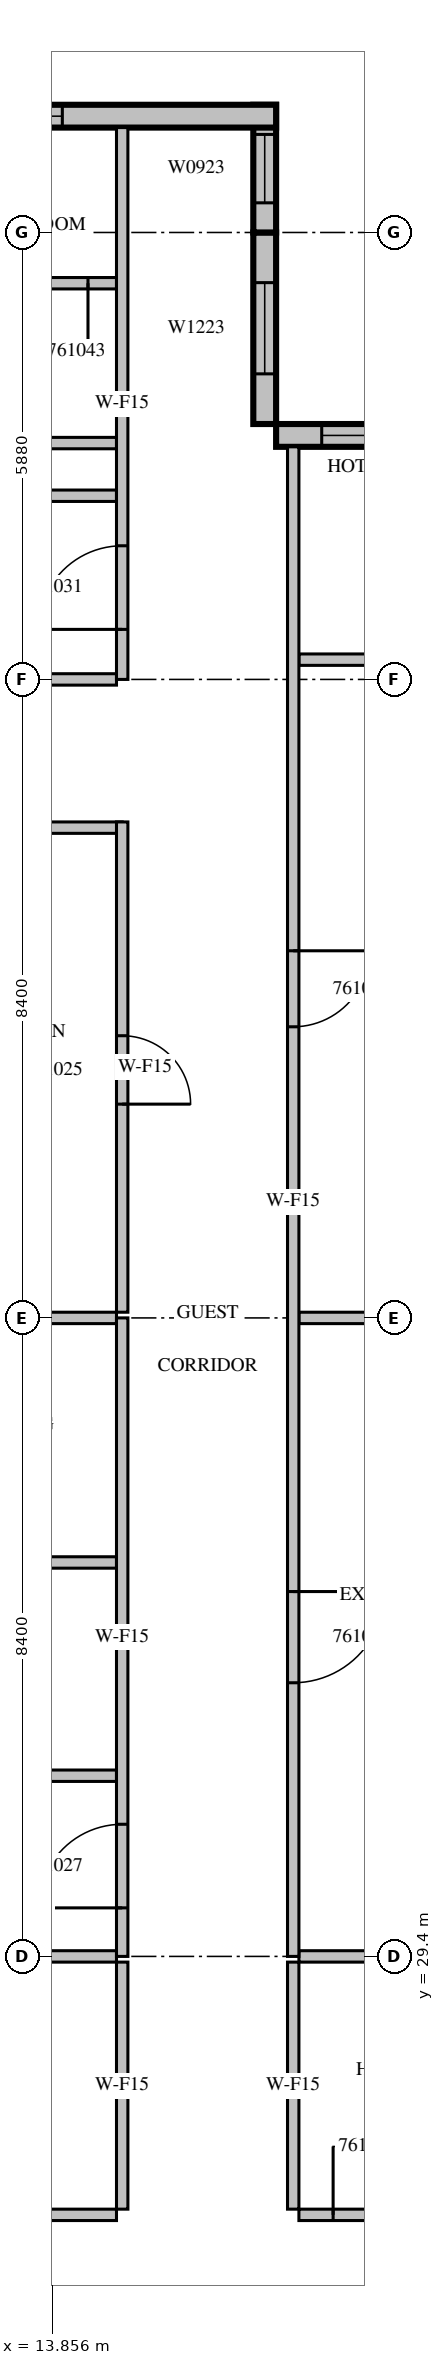
"""IFC4 building model, lengths in metres.
Left out: names, types, materials, properties, quantities, classifications, styles, units other than length and angle.
Written with IfcOpenShell. Run it as: python <this file> out.ifc"""

import sys

from ifc_helpers import new_model, si_unit, direction, frame, frame_2d, origin, place, context, subcontext, project, spatial, rectangle, extrude, source, transform, mapped, element, fill, save


model = new_model("IFC4")
c1 = context("Model", 3, precision=1e-05, world=origin(), true_north=direction((0.0, 1.0)))
c2 = subcontext(c1, "Body", "Model", "MODEL_VIEW")
j1 = project(units=[si_unit("LENGTHUNIT", "METRE"), si_unit("PLANEANGLEUNIT", "RADIAN")], contexts=[c1])
p1 = place(None, origin())
s1 = spatial("IfcSite", under=j1, at=p1, CompositionType="ELEMENT")
p2 = place(p1, origin())
s2 = spatial("IfcBuilding", under=s1, at=p2, CompositionType="ELEMENT")
p3 = place(p2, frame((0.0, 0.0, 265.2)))
s3 = spatial("IfcBuildingStorey", under=s2, at=p3, CompositionType="ELEMENT", Elevation=265.2)
m1 = source(origin(), c2, "Body", "SweptSolid", [
    extrude(rectangle(XDim=4.2, YDim=0.3, at=frame_2d((2.1, 0.0))), origin(), (0.0, 0.0, 1.0), 3.4),
])
p4 = place(p3, frame((21.0, 49.41, 0.0), z_axis=(0.0, 0.0, 1.0), x_axis=(-1.0, 0.0, 0.0)))
e1 = element("IfcWall", 1, at=p4, inside=s3, PredefinedType="STANDARD", context=c2, shape_type="MappedRepresentation", body=[
    mapped(m1, transform((0.0, 0.0, 0.0), scale=1.0)),
])
m2 = source(origin(), c2, "Body", "SweptSolid", [
    extrude(rectangle(XDim=3.0, YDim=2.3, at=frame_2d((1.5, 1.15))), frame((0.0, 0.16, 0.0), z_axis=(0.0, -1.0, 0.0), x_axis=(1.0, 0.0, 0.0)), (0.0, 0.0, 1.0), 0.32),
])
p5 = place(p4, frame((0.6, 0.0, 0.6)))
e2 = element("IfcOpeningElement", 2, at=p5, cuts=e1, PredefinedType="OPENING", context=c2, shape_type="MappedRepresentation", body=[
    mapped(m2, transform((0.0, 0.0, 0.0), scale=1.0)),
])
m3 = source(origin(), c2, "Body", "SweptSolid", [
    extrude(rectangle(XDim=2.52, YDim=0.3, at=frame_2d((1.26, 0.0))), origin(), (0.0, 0.0, 1.0), 3.4),
])
p6 = place(p3, frame((16.65, 49.56, 0.0), z_axis=(0.0, 0.0, 1.0), x_axis=(0.0, 1.0, 0.0)))
e3 = element("IfcWall", 3, at=p6, inside=s3, PredefinedType="STANDARD", context=c2, shape_type="MappedRepresentation", body=[
    mapped(m3, transform((0.0, 0.0, 0.0), scale=1.0)),
])
m4 = source(origin(), c2, "Body", "SweptSolid", [
    extrude(rectangle(XDim=1.2, YDim=2.3, at=frame_2d((0.6, 1.15))), frame((0.0, 0.16, 0.0), z_axis=(0.0, -1.0, 0.0), x_axis=(1.0, 0.0, 0.0)), (0.0, 0.0, 1.0), 0.32),
])
p7 = place(p6, frame((0.66, 0.0, 0.6)))
e4 = element("IfcOpeningElement", 4, at=p7, cuts=e3, PredefinedType="OPENING", context=c2, shape_type="MappedRepresentation", body=[
    mapped(m4, transform((0.0, 0.0, 0.0), scale=1.0)),
])
m5 = source(origin(), c2, "Body", "SweptSolid", [
    extrude(rectangle(XDim=1.68, YDim=0.3, at=frame_2d((0.84, 0.0))), origin(), (0.0, 0.0, 1.0), 3.4),
])
p8 = place(p3, frame((16.65, 52.08, 0.0), z_axis=(0.0, 0.0, 1.0), x_axis=(0.0, 1.0, 0.0)))
e5 = element("IfcWall", 5, at=p8, inside=s3, PredefinedType="STANDARD", context=c2, shape_type="MappedRepresentation", body=[
    mapped(m5, transform((0.0, 0.0, 0.0), scale=1.0)),
])
m6 = source(origin(), c2, "Body", "SweptSolid", [
    extrude(rectangle(XDim=0.9, YDim=2.3, at=frame_2d((0.45, 1.15))), frame((0.0, 0.16, 0.0), z_axis=(0.0, -1.0, 0.0), x_axis=(1.0, 0.0, 0.0)), (0.0, 0.0, 1.0), 0.32),
])
p9 = place(p8, frame((0.39, 0.0, 0.6)))
e6 = element("IfcOpeningElement", 6, at=p9, cuts=e5, PredefinedType="OPENING", context=c2, shape_type="MappedRepresentation", body=[
    mapped(m6, transform((0.0, 0.0, 0.0), scale=1.0)),
])
m7 = source(origin(), c2, "Body", "SweptSolid", [
    extrude(rectangle(XDim=10.5, YDim=0.3, at=frame_2d((5.25, 0.0))), origin(), (0.0, 0.0, 1.0), 3.4),
])
p10 = place(p3, frame((16.8, 53.61, 0.0), z_axis=(0.0, 0.0, 1.0), x_axis=(-1.0, 0.0, 0.0)))
e7 = element("IfcWall", 7, at=p10, inside=s3, PredefinedType="STANDARD", context=c2, shape_type="MappedRepresentation", body=[
    mapped(m7, transform((0.0, 0.0, 0.0), scale=1.0)),
])
m8 = source(origin(), c2, "Body", "SweptSolid", [
    extrude(rectangle(XDim=1.8, YDim=2.3, at=frame_2d((0.9, 1.15))), frame((0.0, 0.16, 0.0), z_axis=(0.0, -1.0, 0.0), x_axis=(1.0, 0.0, 0.0)), (0.0, 0.0, 1.0), 0.32),
])
p11 = place(p10, frame((8.025, 0.0, 0.6)))
e8 = element("IfcOpeningElement", 8, at=p11, cuts=e7, PredefinedType="OPENING", context=c2, shape_type="MappedRepresentation", body=[
    mapped(m8, transform((0.0, 0.0, 0.0), scale=1.0)),
])
m9 = source(origin(), c2, "Body", "SweptSolid", [
    extrude(rectangle(XDim=2.4, YDim=2.3, at=frame_2d((1.2, 1.15))), frame((0.0, 0.16, 0.0), z_axis=(0.0, -1.0, 0.0), x_axis=(1.0, 0.0, 0.0)), (0.0, 0.0, 1.0), 0.32),
])
p12 = place(p10, frame((2.812, 0.0, 0.6)))
e9 = element("IfcOpeningElement", 9, at=p12, cuts=e7, PredefinedType="OPENING", context=c2, shape_type="MappedRepresentation", body=[
    mapped(m9, transform((0.0, 0.0, 0.0), scale=1.0)),
])
m10 = source(origin(), c2, "Body", "SweptSolid", [
    extrude(rectangle(XDim=8.195, YDim=0.15, at=frame_2d((4.098, 0.0))), origin(), (0.0, 0.0, 1.0), 3.4),
])
p13 = place(p3, frame((6.505, 26.0, 0.0), z_axis=(0.0, 0.0, 1.0), x_axis=(1.0, 0.0, 0.0)))
e10 = element("IfcWall", 10, at=p13, inside=s3, PredefinedType="PARTITIONING", context=c2, shape_type="MappedRepresentation", body=[
    mapped(m10, transform((0.0, 0.0, 0.0), scale=1.0)),
])
m11 = source(origin(), c2, "Body", "SweptSolid", [
    extrude(rectangle(XDim=0.9, YDim=2.1, at=frame_2d((0.45, 1.05))), frame((0.0, 0.085, 0.0), z_axis=(0.0, -1.0, 0.0), x_axis=(1.0, 0.0, 0.0)), (0.0, 0.0, 1.0), 0.17),
])
p14 = place(p13, frame((0.695, 0.0, 0.0)))
e11 = element("IfcOpeningElement", 11, at=p14, cuts=e10, PredefinedType="OPENING", context=c2, shape_type="MappedRepresentation", body=[
    mapped(m11, transform((0.0, 0.0, 0.0), scale=1.0)),
])
p15 = place(p13, frame((5.62, 0.0, 0.0)))
e12 = element("IfcOpeningElement", 12, at=p15, cuts=e10, PredefinedType="OPENING", context=c2, shape_type="MappedRepresentation", body=[
    mapped(m11, transform((0.0, 0.0, 0.0), scale=1.0)),
])
m12 = source(origin(), c2, "Body", "SweptSolid", [
    extrude(rectangle(XDim=3.6, YDim=0.15, at=frame_2d((1.8, 0.0))), origin(), (0.0, 0.0, 1.0), 3.4),
])
p16 = place(p3, frame((17.1, 26.0, 0.0), z_axis=(0.0, 0.0, 1.0), x_axis=(1.0, 0.0, 0.0)))
e13 = element("IfcWall", 13, at=p16, inside=s3, PredefinedType="PARTITIONING", context=c2, shape_type="MappedRepresentation", body=[
    mapped(m12, transform((0.0, 0.0, 0.0), scale=1.0)),
])
p17 = place(p16, frame((0.45, 0.0, 0.0)))
e14 = element("IfcOpeningElement", 14, at=p17, cuts=e13, PredefinedType="OPENING", context=c2, shape_type="MappedRepresentation", body=[
    mapped(m11, transform((0.0, 0.0, 0.0), scale=1.0)),
])
m13 = source(origin(), c2, "Body", "SweptSolid", [
    extrude(rectangle(XDim=3.25, YDim=0.15, at=frame_2d((1.625, 0.0))), origin(), (0.0, 0.0, 1.0), 3.4),
])
for number, where, z_axis, x_axis in (
    (15, (14.775, 26.075, 0.0), (0.0, 0.0, 1.0), (0.0, 1.0, 0.0)),
    (16, (17.025, 29.325, 0.0), (0.0, 0.0, 1.0), (0.0, -1.0, 0.0)),
):
    element("IfcWall", number, at=place(p3, frame(where, z_axis=z_axis, x_axis=x_axis)), inside=s3, PredefinedType="PARTITIONING", context=c2, shape_type="MappedRepresentation", body=[
        mapped(m13, transform((0.0, 0.0, 0.0), scale=1.0)),
    ])
m14 = source(origin(), c2, "Body", "SweptSolid", [
    extrude(rectangle(XDim=3.801, YDim=0.15, at=frame_2d((1.901, 0.0))), origin(), (0.0, 0.0, 1.0), 3.4),
])
p18 = place(p3, frame((14.7, 29.4, 0.0), z_axis=(0.0, 0.0, 1.0), x_axis=(-1.0, 0.0, 0.0)))
e17 = element("IfcWall", 17, at=p18, inside=s3, PredefinedType="PARTITIONING", context=c2, shape_type="MappedRepresentation", body=[
    mapped(m14, transform((0.0, 0.0, 0.0), scale=1.0)),
])
m15 = source(origin(), c2, "Body", "SweptSolid", [
    extrude(rectangle(XDim=3.101, YDim=0.15, at=frame_2d((1.55, 0.0))), origin(), (0.0, 0.0, 1.0), 3.4),
])
p19 = place(p3, frame((20.201, 29.4, 0.0), z_axis=(0.0, 0.0, 1.0), x_axis=(-1.0, 0.0, 0.0)))
e18 = element("IfcWall", 18, at=p19, inside=s3, PredefinedType="PARTITIONING", context=c2, shape_type="MappedRepresentation", body=[
    mapped(m15, transform((0.0, 0.0, 0.0), scale=1.0)),
])
m16 = source(origin(), c2, "Body", "SweptSolid", [
    extrude(rectangle(XDim=3.675, YDim=0.15, at=frame_2d((1.837, 0.0))), origin(), (0.0, 0.0, 1.0), 3.4),
])
p20 = place(p3, frame((14.775, 44.25, 0.0), z_axis=(0.0, 0.0, 1.0), x_axis=(-1.0, 0.0, 0.0)))
e19 = element("IfcWall", 19, at=p20, inside=s3, PredefinedType="PARTITIONING", context=c2, shape_type="MappedRepresentation", body=[
    mapped(m16, transform((0.0, 0.0, 0.0), scale=1.0)),
])
m17 = source(origin(), c2, "Body", "SweptSolid", [
    extrude(rectangle(XDim=6.45, YDim=0.15, at=frame_2d((3.225, 0.0))), origin(), (0.0, 0.0, 1.0), 3.4),
])
p21 = place(p3, frame((14.775, 37.875, 0.0), z_axis=(0.0, 0.0, 1.0), x_axis=(0.0, 1.0, 0.0)))
e20 = element("IfcWall", 20, at=p21, inside=s3, PredefinedType="PARTITIONING", context=c2, shape_type="MappedRepresentation", body=[
    mapped(m17, transform((0.0, 0.0, 0.0), scale=1.0)),
])
p22 = place(p21, frame((2.737, 0.0, 0.0)))
e21 = element("IfcOpeningElement", 21, at=p22, cuts=e20, PredefinedType="OPENING", context=c2, shape_type="MappedRepresentation", body=[
    mapped(m11, transform((0.0, 0.0, 0.0), scale=1.0)),
])
m18 = source(origin(), c2, "Body", "SweptSolid", [
    extrude(rectangle(XDim=3.65, YDim=0.15, at=frame_2d((1.825, 0.0))), origin(), (0.0, 0.0, 1.0), 3.4),
])
for number, where, z_axis, x_axis in (
    (22, (14.7, 31.777, 0.0), (0.0, 0.0, 1.0), (-1.0, 0.0, 0.0)),
    (23, (14.7, 34.583, 0.0), (0.0, 0.0, 1.0), (-1.0, 0.0, 0.0)),
    (24, (14.7, 37.8, 0.0), (0.0, 0.0, 1.0), (-1.0, 0.0, 0.0)),
    (25, (14.7, 48.617, 0.0), (0.0, 0.0, 1.0), (-1.0, 0.0, 0.0)),
    (26, (14.7, 49.309, 0.0), (0.0, 0.0, 1.0), (-1.0, 0.0, 0.0)),
):
    element("IfcWall", number, at=place(p3, frame(where, z_axis=z_axis, x_axis=x_axis)), inside=s3, PredefinedType="PARTITIONING", context=c2, shape_type="MappedRepresentation", body=[
        mapped(m18, transform((0.0, 0.0, 0.0), scale=1.0)),
    ])
p23 = place(p3, frame((14.7, 51.412, 0.0), z_axis=(0.0, 0.0, 1.0), x_axis=(-1.0, 0.0, 0.0)))
e27 = element("IfcWall", 27, at=p23, inside=s3, PredefinedType="PARTITIONING", context=c2, shape_type="MappedRepresentation", body=[
    mapped(m18, transform((0.0, 0.0, 0.0), scale=1.0)),
])
p24 = place(p23, frame((1.375, 0.0, 0.0)))
e28 = element("IfcOpeningElement", 28, at=p24, cuts=e27, PredefinedType="OPENING", context=c2, shape_type="MappedRepresentation", body=[
    mapped(m11, transform((0.0, 0.0, 0.0), scale=1.0)),
])
p25 = place(p23, frame((0.375, 0.0, 0.0)))
e29 = element("IfcOpeningElement", 29, at=p25, cuts=e27, PredefinedType="OPENING", context=c2, shape_type="MappedRepresentation", body=[
    mapped(m11, transform((0.0, 0.0, 0.0), scale=1.0)),
])
p26 = place(p23, frame((2.375, 0.0, 0.0)))
e30 = element("IfcOpeningElement", 30, at=p26, cuts=e27, PredefinedType="OPENING", context=c2, shape_type="MappedRepresentation", body=[
    mapped(m11, transform((0.0, 0.0, 0.0), scale=1.0)),
])
p27 = place(p3, frame((14.7, 46.2, 0.0), z_axis=(0.0, 0.0, 1.0), x_axis=(-1.0, 0.0, 0.0)))
e31 = element("IfcWall", 31, at=p27, inside=s3, PredefinedType="PARTITIONING", context=c2, shape_type="MappedRepresentation", body=[
    mapped(m18, transform((0.0, 0.0, 0.0), scale=1.0)),
])
p28 = place(p3, frame((17.1, 46.46, 0.0), z_axis=(0.0, 0.0, 1.0), x_axis=(1.0, 0.0, 0.0)))
e32 = element("IfcWall", 32, at=p28, inside=s3, PredefinedType="PARTITIONING", context=c2, shape_type="MappedRepresentation", body=[
    mapped(m15, transform((0.0, 0.0, 0.0), scale=1.0)),
])
p29 = place(p28, frame((1.35, 0.0, 0.0)))
e33 = element("IfcOpeningElement", 33, at=p29, cuts=e32, PredefinedType="OPENING", context=c2, shape_type="MappedRepresentation", body=[
    mapped(m11, transform((0.0, 0.0, 0.0), scale=1.0)),
])
p30 = place(p3, frame((20.201, 37.8, 0.0), z_axis=(0.0, 0.0, 1.0), x_axis=(-1.0, 0.0, 0.0)))
e34 = element("IfcWall", 34, at=p30, inside=s3, PredefinedType="PARTITIONING", context=c2, shape_type="MappedRepresentation", body=[
    mapped(m15, transform((0.0, 0.0, 0.0), scale=1.0)),
])
m19 = source(origin(), c2, "Body", "SweptSolid", [
    extrude(rectangle(XDim=8.4, YDim=0.15, at=frame_2d((4.2, 0.0))), origin(), (0.0, 0.0, 1.0), 3.4),
])
p31 = place(p3, frame((14.775, 29.4, 0.0), z_axis=(0.0, 0.0, 1.0), x_axis=(0.0, 1.0, 0.0)))
e35 = element("IfcWall", 35, at=p31, inside=s3, PredefinedType="PARTITIONING", context=c2, shape_type="MappedRepresentation", body=[
    mapped(m19, transform((0.0, 0.0, 0.0), scale=1.0)),
])
m20 = source(origin(), c2, "Body", "SweptSolid", [
    extrude(rectangle(XDim=1.1, YDim=2.1, at=frame_2d((0.55, 1.05))), frame((0.0, 0.085, 0.0), z_axis=(0.0, -1.0, 0.0), x_axis=(1.0, 0.0, 0.0)), (0.0, 0.0, 1.0), 0.17),
])
p32 = place(p31, frame((0.638, 0.0, 0.0)))
e36 = element("IfcOpeningElement", 36, at=p32, cuts=e35, PredefinedType="OPENING", context=c2, shape_type="MappedRepresentation", body=[
    mapped(m20, transform((0.0, 0.0, 0.0), scale=1.0)),
])
m21 = source(origin(), c2, "Body", "SweptSolid", [
    extrude(rectangle(XDim=7.26, YDim=0.15, at=frame_2d((3.63, 0.0))), origin(), (0.0, 0.0, 1.0), 3.4),
])
p33 = place(p3, frame((14.775, 46.2, 0.0), z_axis=(0.0, 0.0, 1.0), x_axis=(0.0, 1.0, 0.0)))
e37 = element("IfcWall", 37, at=p33, inside=s3, PredefinedType="PARTITIONING", context=c2, shape_type="MappedRepresentation", body=[
    mapped(m21, transform((0.0, 0.0, 0.0), scale=1.0)),
])
p34 = place(p33, frame((0.658, 0.0, 0.0)))
e38 = element("IfcOpeningElement", 38, at=p34, cuts=e37, PredefinedType="OPENING", context=c2, shape_type="MappedRepresentation", body=[
    mapped(m20, transform((0.0, 0.0, 0.0), scale=1.0)),
])
m22 = source(origin(), c2, "Body", "SweptSolid", [
    extrude(rectangle(XDim=19.86, YDim=0.15, at=frame_2d((9.93, 0.0))), origin(), (0.0, 0.0, 1.0), 3.4),
])
p35 = place(p3, frame((17.025, 49.26, 0.0), z_axis=(0.0, 0.0, 1.0), x_axis=(0.0, -1.0, 0.0)))
e39 = element("IfcWall", 39, at=p35, inside=s3, PredefinedType="PARTITIONING", context=c2, shape_type="MappedRepresentation", body=[
    mapped(m22, transform((0.0, 0.0, 0.0), scale=1.0)),
])
m23 = source(origin(), c2, "Body", "SweptSolid", [
    extrude(rectangle(XDim=1.2, YDim=2.1, at=frame_2d((0.6, 1.05))), frame((0.0, 0.085, 0.0), z_axis=(0.0, -1.0, 0.0), x_axis=(1.0, 0.0, 0.0)), (0.0, 0.0, 1.0), 0.17),
])
p36 = place(p35, frame((15.06, 0.0, 0.0)))
e40 = element("IfcOpeningElement", 40, at=p36, cuts=e39, PredefinedType="OPENING", context=c2, shape_type="MappedRepresentation", body=[
    mapped(m23, transform((0.0, 0.0, 0.0), scale=1.0)),
])
m24 = source(origin(), c2, "Body", "SweptSolid", [
    extrude(rectangle(XDim=1.0, YDim=2.1, at=frame_2d((0.5, 1.05))), frame((0.0, 0.085, 0.0), z_axis=(0.0, -1.0, 0.0), x_axis=(1.0, 0.0, 0.0)), (0.0, 0.0, 1.0), 0.17),
])
p37 = place(p35, frame((6.63, 0.0, 0.0)))
e41 = element("IfcOpeningElement", 41, at=p37, cuts=e39, PredefinedType="OPENING", context=c2, shape_type="MappedRepresentation", body=[
    mapped(m24, transform((0.0, 0.0, 0.0), scale=1.0)),
])
m25 = source(origin(), c2, "Body", "SweptSolid", [
    extrude(rectangle(XDim=3.0, YDim=2.3, at=frame_2d((1.5, 1.15))), frame((0.0, 0.03, 0.0), z_axis=(0.0, -1.0, 0.0), x_axis=(1.0, 0.0, 0.0)), (0.0, 0.0, 1.0), 0.06),
])
p38 = place(p5, origin())
e42 = element("IfcWindow", 42, at=p38, inside=s3, PartitioningType="SINGLE_PANEL", PredefinedType="WINDOW", context=c2, shape_type="MappedRepresentation", body=[
    mapped(m25, transform((0.0, 0.0, 0.0), scale=1.0)),
])
fill(e2, e42)
m26 = source(origin(), c2, "Body", "SweptSolid", [
    extrude(rectangle(XDim=1.2, YDim=2.3, at=frame_2d((0.6, 1.15))), frame((0.0, 0.03, 0.0), z_axis=(0.0, -1.0, 0.0), x_axis=(1.0, 0.0, 0.0)), (0.0, 0.0, 1.0), 0.06),
])
p39 = place(p7, origin())
e43 = element("IfcWindow", 43, at=p39, inside=s3, PartitioningType="SINGLE_PANEL", PredefinedType="WINDOW", context=c2, shape_type="MappedRepresentation", body=[
    mapped(m26, transform((0.0, 0.0, 0.0), scale=1.0)),
])
fill(e4, e43)
m27 = source(origin(), c2, "Body", "SweptSolid", [
    extrude(rectangle(XDim=0.9, YDim=2.3, at=frame_2d((0.45, 1.15))), frame((0.0, 0.03, 0.0), z_axis=(0.0, -1.0, 0.0), x_axis=(1.0, 0.0, 0.0)), (0.0, 0.0, 1.0), 0.06),
])
p40 = place(p9, origin())
e44 = element("IfcWindow", 44, at=p40, inside=s3, PartitioningType="SINGLE_PANEL", PredefinedType="WINDOW", context=c2, shape_type="MappedRepresentation", body=[
    mapped(m27, transform((0.0, 0.0, 0.0), scale=1.0)),
])
fill(e6, e44)
m28 = source(origin(), c2, "Body", "SweptSolid", [
    extrude(rectangle(XDim=2.4, YDim=2.3, at=frame_2d((1.2, 1.15))), frame((0.0, 0.03, 0.0), z_axis=(0.0, -1.0, 0.0), x_axis=(1.0, 0.0, 0.0)), (0.0, 0.0, 1.0), 0.06),
])
p41 = place(p12, origin())
e45 = element("IfcWindow", 45, at=p41, inside=s3, PartitioningType="SINGLE_PANEL", PredefinedType="WINDOW", context=c2, shape_type="MappedRepresentation", body=[
    mapped(m28, transform((0.0, 0.0, 0.0), scale=1.0)),
])
fill(e9, e45)
m29 = source(origin(), c2, "Body", "SweptSolid", [
    extrude(rectangle(XDim=0.9, YDim=2.1, at=frame_2d((0.45, 1.05))), frame((0.0, 0.025, 0.0), z_axis=(0.0, -1.0, 0.0), x_axis=(1.0, 0.0, 0.0)), (0.0, 0.0, 1.0), 0.05),
])
p42 = place(p17, origin())
e46 = element("IfcDoor", 46, at=p42, inside=s3, OperationType="SINGLE_SWING_LEFT", PredefinedType="DOOR", context=c2, shape_type="MappedRepresentation", body=[
    mapped(m29, transform((0.0, 0.0, 0.0), scale=1.0)),
])
fill(e14, e46)
p43 = place(p22, origin())
e47 = element("IfcDoor", 47, at=p43, inside=s3, OperationType="SINGLE_SWING_RIGHT", PredefinedType="DOOR", context=c2, shape_type="MappedRepresentation", body=[
    mapped(m29, transform((0.0, 0.0, 0.0), scale=1.0)),
])
fill(e21, e47)
m30 = source(origin(), c2, "Body", "SweptSolid", [
    extrude(rectangle(XDim=1.1, YDim=2.1, at=frame_2d((0.55, 1.05))), frame((0.0, 0.025, 0.0), z_axis=(0.0, -1.0, 0.0), x_axis=(1.0, 0.0, 0.0)), (0.0, 0.0, 1.0), 0.05),
])
p44 = place(p32, origin())
e48 = element("IfcDoor", 48, at=p44, inside=s3, OperationType="SINGLE_SWING_LEFT", PredefinedType="DOOR", context=c2, shape_type="MappedRepresentation", body=[
    mapped(m30, transform((0.0, 0.0, 0.0), scale=1.0)),
])
fill(e36, e48)
p45 = place(p34, origin())
e49 = element("IfcDoor", 49, at=p45, inside=s3, OperationType="SINGLE_SWING_LEFT", PredefinedType="DOOR", context=c2, shape_type="MappedRepresentation", body=[
    mapped(m30, transform((0.0, 0.0, 0.0), scale=1.0)),
])
fill(e38, e49)
m31 = source(origin(), c2, "Body", "SweptSolid", [
    extrude(rectangle(XDim=1.2, YDim=2.1, at=frame_2d((0.6, 1.05))), frame((0.0, 0.025, 0.0), z_axis=(0.0, -1.0, 0.0), x_axis=(1.0, 0.0, 0.0)), (0.0, 0.0, 1.0), 0.05),
])
p46 = place(p36, origin())
e50 = element("IfcDoor", 50, at=p46, inside=s3, OperationType="SINGLE_SWING_LEFT", PredefinedType="DOOR", context=c2, shape_type="MappedRepresentation", body=[
    mapped(m31, transform((0.0, 0.0, 0.0), scale=1.0)),
])
fill(e40, e50)
m32 = source(origin(), c2, "Body", "SweptSolid", [
    extrude(rectangle(XDim=1.0, YDim=2.1, at=frame_2d((0.5, 1.05))), frame((0.0, 0.025, 0.0), z_axis=(0.0, -1.0, 0.0), x_axis=(1.0, 0.0, 0.0)), (0.0, 0.0, 1.0), 0.05),
])
p47 = place(p37, origin())
e51 = element("IfcDoor", 51, at=p47, inside=s3, OperationType="SINGLE_SWING_LEFT", PredefinedType="DOOR", context=c2, shape_type="MappedRepresentation", body=[
    mapped(m32, transform((0.0, 0.0, 0.0), scale=1.0)),
])
fill(e41, e51)
p48 = place(p25, origin())
e52 = element("IfcDoor", 52, at=p48, inside=s3, OperationType="SINGLE_SWING_LEFT", PredefinedType="DOOR", context=c2, shape_type="MappedRepresentation", body=[
    mapped(m29, transform((0.0, 0.0, 0.0), scale=1.0)),
])
fill(e29, e52)
save(model, sys.argv[1])
